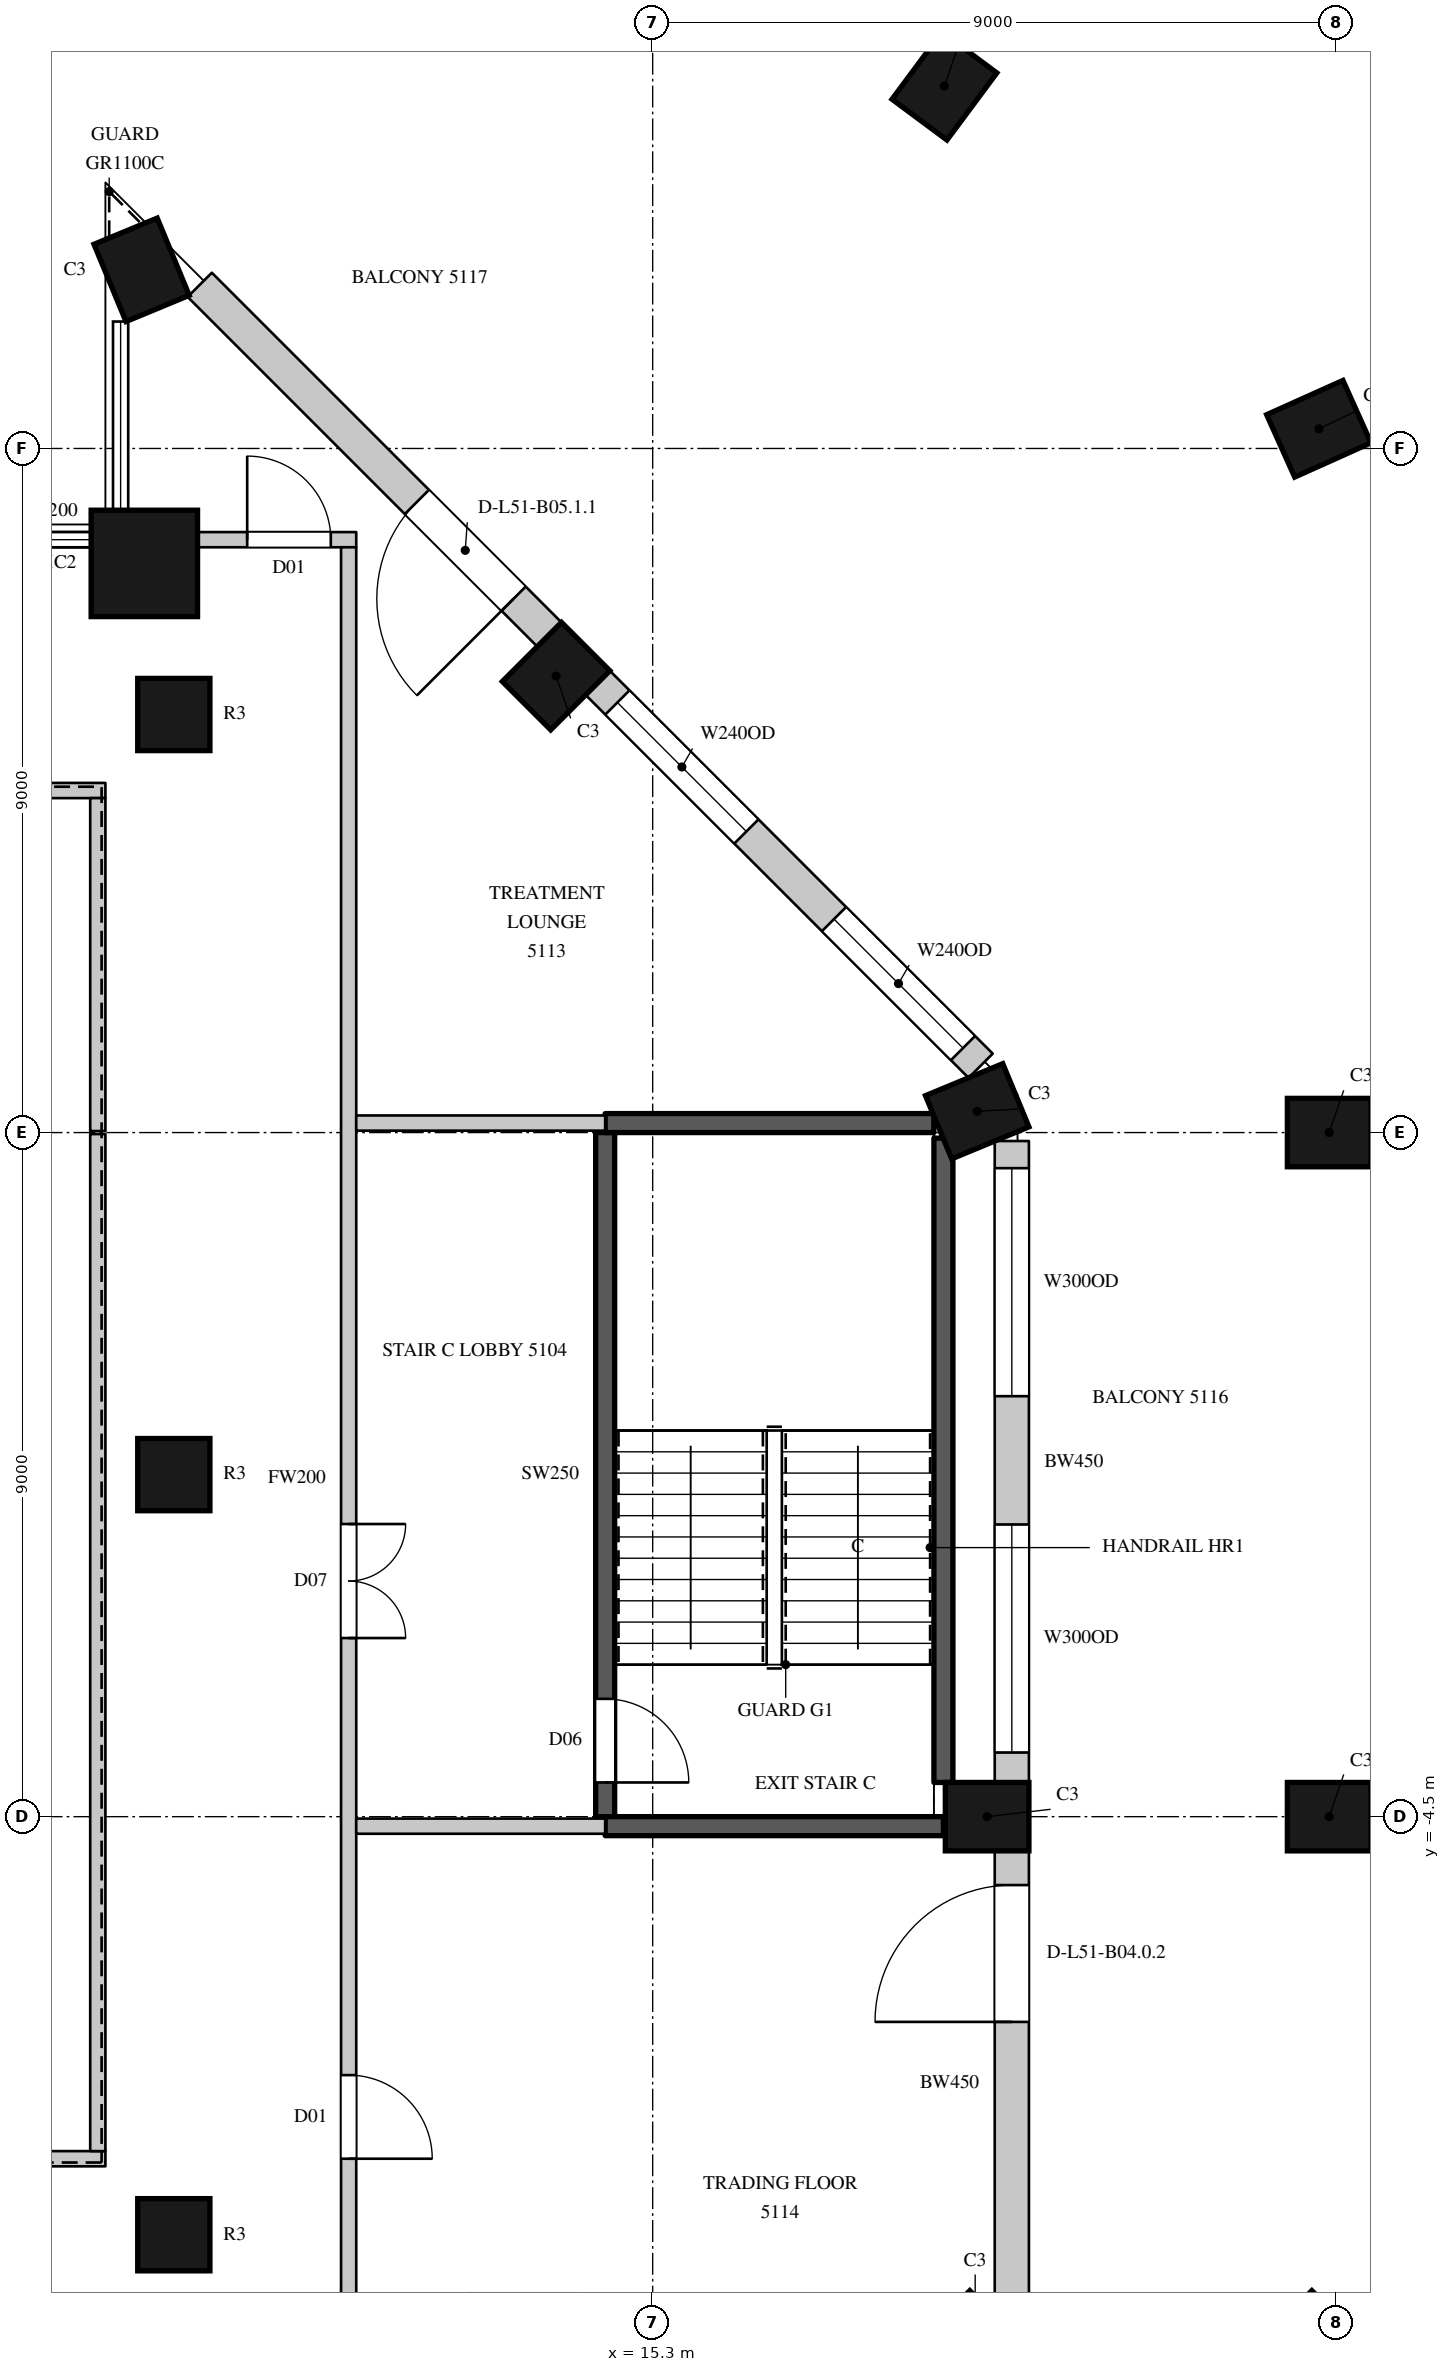
"""IFC4 building model, lengths in metres.
Left out: names, types, materials, properties, quantities, classifications, styles, units other than length and angle.
Written with IfcOpenShell. Run it as: python <this file> out.ifc"""

import sys

from ifc_helpers import new_model, si_unit, direction, frame, frame_2d, origin, origin_2d, place, context, subcontext, project, spatial, rectangle, circle, extrude, element, fill, save


model = new_model("IFC4")
c1 = context("Model", 3, precision=1e-05, world=origin(), true_north=direction((0.0, 1.0)))
c2 = subcontext(c1, "Body", "Model", "MODEL_VIEW")
j1 = project(units=[si_unit("LENGTHUNIT", "METRE"), si_unit("PLANEANGLEUNIT", "RADIAN")], contexts=[c1])
p1 = place(None, origin())
s1 = spatial("IfcSite", under=j1, at=p1, CompositionType="ELEMENT")
p2 = place(p1, origin())
s2 = spatial("IfcBuilding", under=s1, at=p2, CompositionType="ELEMENT")
p3 = place(p2, frame((0.0, 0.0, 230.2)))
s3 = spatial("IfcBuildingStorey", under=s2, at=p3, CompositionType="ELEMENT", Elevation=230.2)
for number, where, z_axis, x_axis in (
    (1, (19.543, -11.443, 0.0), (0.0, 0.0, 1.0), (0.707, 0.707, 0.0)),
    (2, (19.7, -4.5, 0.0), (0.0, 0.0, 1.0), (0.0, 1.0, 0.0)),
    (3, (19.57, 4.78, 0.0), (0.0, 0.0, 1.0), (-0.383, 0.924, 0.0)),
    (4, (14.029, 10.505, 0.0), (0.0, 0.0, 1.0), (-0.707, 0.707, 0.0)),
    (5, (8.576, 15.85, 0.0), (0.0, 0.0, 1.0), (-0.924, -0.383, 0.0)),
):
    element("IfcColumn", number, at=place(p3, frame(where, z_axis=z_axis, x_axis=x_axis)), inside=s3, PredefinedType="COLUMN", context=c2, shape_type="SweptSolid", body=[
        extrude(rectangle(XDim=0.9, YDim=1.1, at=origin_2d()), origin(), (0.0, 0.0, 1.0), 4.1),
    ])
p4 = place(p3, frame((8.612, 11.988, 0.0), z_axis=(0.0, 0.0, 1.0), x_axis=(1.0, 0.0, 0.0)))
e6 = element("IfcColumn", 6, at=p4, inside=s3, PredefinedType="COLUMN", context=c2, shape_type="SweptSolid", body=[
    extrude(circle(Radius=0.7, at=origin_2d()), origin(), (0.0, 0.0, 1.0), 4.1),
])
for number, where, z_axis, x_axis in (
    (7, (24.043, -11.443, 0.0), (0.0, 0.0, 1.0), (0.707, 0.707, 0.0)),
    (8, (24.2, -4.5, 0.0), (0.0, 0.0, 1.0), (0.0, 1.0, 0.0)),
    (9, (24.2, 4.5, 0.0), (0.0, 0.0, 1.0), (0.0, 1.0, 0.0)),
    (10, (24.064, 13.759, 0.0), (0.0, 0.0, 1.0), (-0.41, 0.912, 0.0)),
    (11, (19.138, 18.268, 0.0), (0.0, 0.0, 1.0), (-0.803, 0.596, 0.0)),
):
    element("IfcColumn", number, at=place(p3, frame(where, z_axis=z_axis, x_axis=x_axis)), inside=s3, PredefinedType="COLUMN", context=c2, shape_type="SweptSolid", body=[
        extrude(rectangle(XDim=0.9, YDim=1.1, at=origin_2d()), origin(), (0.0, 0.0, 1.0), 4.1),
    ])
for number, where, z_axis, x_axis in (
    (12, (9.0, -10.0, 0.0), (0.0, 0.0, 1.0), (1.0, 0.0, 0.0)),
    (13, (9.0, 0.0, 0.0), (0.0, 0.0, 1.0), (1.0, 0.0, 0.0)),
    (14, (9.0, 10.0, 0.0), (0.0, 0.0, 1.0), (1.0, 0.0, 0.0)),
):
    element("IfcColumn", number, at=place(p3, frame(where, z_axis=z_axis, x_axis=x_axis)), inside=s3, PredefinedType="COLUMN", context=c2, shape_type="SweptSolid", body=[
        extrude(circle(Radius=0.475, at=origin_2d()), origin(), (0.0, 0.0, 1.0), 4.1),
    ])
p5 = place(p3, frame((20.025, -11.064, 0.0), z_axis=(0.0, 0.0, 1.0), x_axis=(0.0, 1.0, 0.0)))
e15 = element("IfcWall", 15, at=p5, inside=s3, PredefinedType="SOLIDWALL", context=c2, shape_type="SweptSolid", body=[
    extrude(rectangle(XDim=6.114, YDim=0.45, at=frame_2d((3.057, 0.0))), origin(), (0.0, 0.0, 1.0), 3.8),
])
p6 = place(p5, frame((3.864, 0.0, 0.0)))
e16 = element("IfcOpeningElement", 16, at=p6, cuts=e15, PredefinedType="OPENING", context=c2, shape_type="SweptSolid", body=[
    extrude(rectangle(XDim=1.8, YDim=2.4, at=frame_2d((0.9, 1.2))), frame((0.0, 0.235, 0.0), z_axis=(0.0, -1.0, 0.0), x_axis=(1.0, 0.0, 0.0)), (0.0, 0.0, 1.0), 0.47),
])
p7 = place(p3, frame((20.025, -4.05, 0.0), z_axis=(0.0, 0.0, 1.0), x_axis=(0.0, 1.0, 0.0)))
e17 = element("IfcWall", 17, at=p7, inside=s3, PredefinedType="SOLIDWALL", context=c2, shape_type="SweptSolid", body=[
    extrude(rectangle(XDim=8.439, YDim=0.45, at=frame_2d((4.219, 0.0))), origin(), (0.0, 0.0, 1.0), 3.8),
])
p8 = place(p7, frame((0.394, 0.0, 1.05)))
e18 = element("IfcOpeningElement", 18, at=p8, cuts=e17, PredefinedType="OPENING", context=c2, shape_type="SweptSolid", body=[
    extrude(rectangle(XDim=3.0, YDim=2.4, at=frame_2d((1.5, 1.2))), frame((0.0, 0.235, 0.0), z_axis=(0.0, -1.0, 0.0), x_axis=(1.0, 0.0, 0.0)), (0.0, 0.0, 1.0), 0.47),
])
p9 = place(p7, frame((5.082, 0.0, 1.05)))
e19 = element("IfcOpeningElement", 19, at=p9, cuts=e17, PredefinedType="OPENING", context=c2, shape_type="SweptSolid", body=[
    extrude(rectangle(XDim=3.0, YDim=2.4, at=frame_2d((1.5, 1.2))), frame((0.0, 0.235, 0.0), z_axis=(0.0, -1.0, 0.0), x_axis=(1.0, 0.0, 0.0)), (0.0, 0.0, 1.0), 0.47),
])
p10 = place(p3, frame((19.615, 5.379, 0.0), z_axis=(0.0, 0.0, 1.0), x_axis=(-0.707089646058, 0.7071239159, 0.0)))
e20 = element("IfcWall", 20, at=p10, inside=s3, PredefinedType="SOLIDWALL", context=c2, shape_type="SweptSolid", body=[
    extrude(rectangle(XDim=7.124, YDim=0.45, at=frame_2d((3.562, 0.0))), origin(), (0.0, 0.0, 1.0), 3.8),
])
p11 = place(p10, frame((0.328, 0.0, 1.05)))
e21 = element("IfcOpeningElement", 21, at=p11, cuts=e20, PredefinedType="OPENING", context=c2, shape_type="SweptSolid", body=[
    extrude(rectangle(XDim=2.4, YDim=2.4, at=frame_2d((1.2, 1.2))), frame((0.0, 0.235, 0.0), z_axis=(0.0, -1.0, 0.0), x_axis=(1.0, 0.0, 0.0)), (0.0, 0.0, 1.0), 0.47),
])
p12 = place(p10, frame((4.359, 0.0, 1.05)))
e22 = element("IfcOpeningElement", 22, at=p12, cuts=e20, PredefinedType="OPENING", context=c2, shape_type="SweptSolid", body=[
    extrude(rectangle(XDim=2.4, YDim=2.4, at=frame_2d((1.2, 1.2))), frame((0.0, 0.235, 0.0), z_axis=(0.0, -1.0, 0.0), x_axis=(1.0, 0.0, 0.0)), (0.0, 0.0, 1.0), 0.47),
])
p13 = place(p3, frame((13.941, 11.053, 0.0), z_axis=(0.0, 0.0, 1.0), x_axis=(-0.707106781187, 0.707106781187, 0.0)))
e23 = element("IfcWall", 23, at=p13, inside=s3, PredefinedType="SOLIDWALL", context=c2, shape_type="SweptSolid", body=[
    extrude(rectangle(XDim=6.505, YDim=0.45, at=frame_2d((3.252, 0.0))), origin(), (0.0, 0.0, 1.0), 3.8),
])
p14 = place(p13, frame((0.665, 0.0, 0.0)))
e24 = element("IfcOpeningElement", 24, at=p14, cuts=e23, PredefinedType="OPENING", context=c2, shape_type="SweptSolid", body=[
    extrude(rectangle(XDim=1.8, YDim=2.4, at=frame_2d((0.9, 1.2))), frame((0.0, 0.235, 0.0), z_axis=(0.0, -1.0, 0.0), x_axis=(1.0, 0.0, 0.0)), (0.0, 0.0, 1.0), 0.47),
])
p15 = place(p3, frame((21.1, -5.1, 0.0), z_axis=(0.0, 0.0, 1.0), x_axis=(0.0, 1.0, 0.0)))
e25 = element("IfcWall", 25, at=p15, inside=s3, PredefinedType="SOLIDWALL", context=c2, shape_type="SweptSolid", body=[
    extrude(rectangle(XDim=3.583, YDim=0.45, at=frame_2d((1.792, 0.0))), origin(), (0.0, 0.0, 1.0), 0.6),
])
p16 = place(p3, frame((21.1, -0.617, 0.0), z_axis=(0.0, 0.0, 1.0), x_axis=(0.0, 1.0, 0.0)))
e26 = element("IfcWall", 26, at=p16, inside=s3, PredefinedType="SOLIDWALL", context=c2, shape_type="SweptSolid", body=[
    extrude(rectangle(XDim=2.567, YDim=0.45, at=frame_2d((1.283, 0.0))), origin(), (0.0, 0.0, 1.0), 0.6),
])
p17 = place(p3, frame((16.206, 10.308, 0.0), z_axis=(0.0, 0.0, 1.0), x_axis=(-0.707057827829, 0.707155731156, 0.0)))
e27 = element("IfcWall", 27, at=p17, inside=s3, PredefinedType="SOLIDWALL", context=c2, shape_type="SweptSolid", body=[
    extrude(rectangle(XDim=2.494, YDim=0.45, at=frame_2d((1.247, 0.0))), origin(), (0.0, 0.0, 1.0), 0.6),
])
p18 = place(p3, frame((12.251, 14.263, 0.0), z_axis=(0.0, 0.0, 1.0), x_axis=(-0.707039709166, 0.707173846846, 0.0)))
e28 = element("IfcWall", 28, at=p18, inside=s3, PredefinedType="SOLIDWALL", context=c2, shape_type="SweptSolid", body=[
    extrude(rectangle(XDim=1.82, YDim=0.45, at=frame_2d((0.91, 0.0))), origin(), (0.0, 0.0, 1.0), 0.6),
])
p19 = place(p3, frame((6.75, 12.3, 0.0), z_axis=(0.0, 0.0, 1.0), x_axis=(1.0, 0.0, 0.0)))
e29 = element("IfcWall", 29, at=p19, inside=s3, PredefinedType="PARTITIONING", context=c2, shape_type="SweptSolid", body=[
    extrude(rectangle(XDim=1.209, YDim=0.2, at=frame_2d((0.604, 0.0))), origin(), (0.0, 0.0, 1.0), 3.8),
])
for number, where, z_axis, x_axis in (
    (30, (-6.1, -9.0, 0.0), (0.0, 0.0, 1.0), (1.0, 0.0, 0.0)),
    (31, (-6.1, 9.0, 0.0), (0.0, 0.0, 1.0), (1.0, 0.0, 0.0)),
):
    element("IfcWall", number, at=place(p3, frame(where, z_axis=z_axis, x_axis=x_axis)), inside=s3, PredefinedType="PARTITIONING", context=c2, shape_type="SweptSolid", body=[
        extrude(rectangle(XDim=14.2, YDim=0.2, at=frame_2d((7.1, 0.0))), origin(), (0.0, 0.0, 1.0), 3.8),
    ])
p20 = place(p3, frame((8.0, -8.9, 0.0), z_axis=(0.0, 0.0, 1.0), x_axis=(0.0, 1.0, 0.0)))
e32 = element("IfcWall", 32, at=p20, inside=s3, PredefinedType="PARTITIONING", context=c2, shape_type="SweptSolid", body=[
    extrude(rectangle(XDim=13.38, YDim=0.2, at=frame_2d((6.69, 0.0))), origin(), (0.0, 0.0, 1.0), 3.8),
])
p21 = place(p3, frame((8.0, 4.52, 0.0), z_axis=(0.0, 0.0, 1.0), x_axis=(0.0, 1.0, 0.0)))
e33 = element("IfcWall", 33, at=p21, inside=s3, PredefinedType="PARTITIONING", context=c2, shape_type="SweptSolid", body=[
    extrude(rectangle(XDim=4.38, YDim=0.2, at=frame_2d((2.19, 0.0))), origin(), (0.0, 0.0, 1.0), 3.8),
])
p22 = place(p3, frame((9.265, 12.3, 0.0), z_axis=(0.0, 0.0, 1.0), x_axis=(1.0, 0.0, 0.0)))
e34 = element("IfcWall", 34, at=p22, inside=s3, PredefinedType="PARTITIONING", context=c2, shape_type="SweptSolid", body=[
    extrude(rectangle(XDim=2.135, YDim=0.2, at=frame_2d((1.067, 0.0))), origin(), (0.0, 0.0, 1.0), 3.8),
])
p23 = place(p22, frame((0.7, 0.0, 0.0)))
e35 = element("IfcOpeningElement", 35, at=p23, cuts=e34, PredefinedType="OPENING", context=c2, shape_type="SweptSolid", body=[
    extrude(rectangle(XDim=1.1, YDim=2.4, at=frame_2d((0.55, 1.2))), frame((0.0, 0.11, 0.0), z_axis=(0.0, -1.0, 0.0), x_axis=(1.0, 0.0, 0.0)), (0.0, 0.0, 1.0), 0.22),
])
p24 = place(p3, frame((11.3, -12.3, 0.0), z_axis=(0.0, 0.0, 1.0), x_axis=(0.0, 1.0, 0.0)))
e36 = element("IfcWall", 36, at=p24, inside=s3, PredefinedType="PARTITIONING", context=c2, shape_type="SweptSolid", body=[
    extrude(rectangle(XDim=24.5, YDim=0.2, at=frame_2d((12.25, 0.0))), origin(), (0.0, 0.0, 1.0), 3.8),
])
p25 = place(p24, frame((10.15, 0.0, 0.0)))
e37 = element("IfcOpeningElement", 37, at=p25, cuts=e36, PredefinedType="OPENING", context=c2, shape_type="SweptSolid", body=[
    extrude(rectangle(XDim=1.5, YDim=2.4, at=frame_2d((0.75, 1.2))), frame((0.0, 0.11, 0.0), z_axis=(0.0, -1.0, 0.0), x_axis=(1.0, 0.0, 0.0)), (0.0, 0.0, 1.0), 0.22),
])
p26 = place(p24, frame((3.3, 0.0, 0.0)))
e38 = element("IfcOpeningElement", 38, at=p26, cuts=e36, PredefinedType="OPENING", context=c2, shape_type="SweptSolid", body=[
    extrude(rectangle(XDim=1.1, YDim=2.4, at=frame_2d((0.55, 1.2))), frame((0.0, 0.11, 0.0), z_axis=(0.0, -1.0, 0.0), x_axis=(1.0, 0.0, 0.0)), (0.0, 0.0, 1.0), 0.22),
])
for number, where, z_axis, x_axis in (
    (39, (11.4, -4.625, 0.0), (0.0, 0.0, 1.0), (1.0, 0.0, 0.0)),
    (40, (11.4, 4.625, 0.0), (0.0, 0.0, 1.0), (1.0, 0.0, 0.0)),
):
    element("IfcWall", number, at=place(p3, frame(where, z_axis=z_axis, x_axis=x_axis)), inside=s3, PredefinedType="PARTITIONING", context=c2, shape_type="SweptSolid", body=[
        extrude(rectangle(XDim=3.275, YDim=0.2, at=frame_2d((1.638, 0.0))), origin(), (0.0, 0.0, 1.0), 3.8),
    ])
p27 = place(p3, frame((14.675, -4.5, 0.0), z_axis=(0.0, 0.0, 1.0), x_axis=(0.0, 1.0, 0.0)))
e41 = element("IfcWall", 41, at=p27, inside=s3, PredefinedType="SHEAR", context=c2, shape_type="SweptSolid", body=[
    extrude(rectangle(XDim=9.0, YDim=0.25, at=frame_2d((4.5, 0.0))), origin(), (0.0, 0.0, 1.0), 3.8),
])
p28 = place(p27, frame((0.45, 0.0, 0.0)))
e42 = element("IfcOpeningElement", 42, at=p28, cuts=e41, PredefinedType="OPENING", context=c2, shape_type="SweptSolid", body=[
    extrude(rectangle(XDim=1.1, YDim=2.2, at=frame_2d((0.55, 1.1))), frame((0.0, 0.135, 0.0), z_axis=(0.0, -1.0, 0.0), x_axis=(1.0, 0.0, 0.0)), (0.0, 0.0, 1.0), 0.27),
])
p29 = place(p3, frame((14.675, -4.625, 0.0), z_axis=(0.0, 0.0, 1.0), x_axis=(1.0, 0.0, 0.0)))
e43 = element("IfcWall", 43, at=p29, inside=s3, PredefinedType="SHEAR", context=c2, shape_type="SweptSolid", body=[
    extrude(rectangle(XDim=4.45, YDim=0.25, at=frame_2d((2.225, 0.0))), origin(), (0.0, 0.0, 1.0), 3.8),
])
p30 = place(p3, frame((14.675, 4.625, 0.0), z_axis=(0.0, 0.0, 1.0), x_axis=(1.0, 0.0, 0.0)))
e44 = element("IfcWall", 44, at=p30, inside=s3, PredefinedType="SHEAR", context=c2, shape_type="SweptSolid", body=[
    extrude(rectangle(XDim=4.324, YDim=0.25, at=frame_2d((2.162, 0.0))), origin(), (0.0, 0.0, 1.0), 3.8),
])
p31 = place(p3, frame((19.125, -4.05, 0.0), z_axis=(0.0, 0.0, 1.0), x_axis=(0.0, 1.0, 0.0)))
e45 = element("IfcWall", 45, at=p31, inside=s3, PredefinedType="SHEAR", context=c2, shape_type="SweptSolid", body=[
    extrude(rectangle(XDim=8.477, YDim=0.25, at=frame_2d((4.238, 0.0))), origin(), (0.0, 0.0, 1.0), 3.8),
])
p32 = place(p6, origin())
e46 = element("IfcDoor", 46, at=p32, inside=s3, OperationType="SLIDING_TO_LEFT", PredefinedType="DOOR", context=c2, shape_type="SweptSolid", body=[
    extrude(rectangle(XDim=1.8, YDim=2.4, at=frame_2d((0.9, 1.2))), frame((0.0, 0.13, 0.0), z_axis=(0.0, -1.0, 0.0), x_axis=(1.0, 0.0, 0.0)), (0.0, 0.0, 1.0), 0.05),
])
fill(e16, e46)
p33 = place(p8, origin())
e47 = element("IfcWindow", 47, at=p33, inside=s3, PartitioningType="SINGLE_PANEL", PredefinedType="WINDOW", context=c2, shape_type="SweptSolid", body=[
    extrude(rectangle(XDim=3.0, YDim=2.4, at=frame_2d((1.5, 1.2))), frame((0.0, 0.135, 0.0), z_axis=(0.0, -1.0, 0.0), x_axis=(1.0, 0.0, 0.0)), (0.0, 0.0, 1.0), 0.06),
])
fill(e18, e47)
p34 = place(p9, origin())
e48 = element("IfcWindow", 48, at=p34, inside=s3, PartitioningType="SINGLE_PANEL", PredefinedType="WINDOW", context=c2, shape_type="SweptSolid", body=[
    extrude(rectangle(XDim=3.0, YDim=2.4, at=frame_2d((1.5, 1.2))), frame((0.0, 0.135, 0.0), z_axis=(0.0, -1.0, 0.0), x_axis=(1.0, 0.0, 0.0)), (0.0, 0.0, 1.0), 0.06),
])
fill(e19, e48)
p35 = place(p11, origin())
e49 = element("IfcWindow", 49, at=p35, inside=s3, PartitioningType="SINGLE_PANEL", PredefinedType="WINDOW", context=c2, shape_type="SweptSolid", body=[
    extrude(rectangle(XDim=2.4, YDim=2.4, at=frame_2d((1.2, 1.2))), frame((0.0, 0.135, 0.0), z_axis=(0.0, -1.0, 0.0), x_axis=(1.0, 0.0, 0.0)), (0.0, 0.0, 1.0), 0.06),
])
fill(e21, e49)
p36 = place(p12, origin())
e50 = element("IfcWindow", 50, at=p36, inside=s3, PartitioningType="SINGLE_PANEL", PredefinedType="WINDOW", context=c2, shape_type="SweptSolid", body=[
    extrude(rectangle(XDim=2.4, YDim=2.4, at=frame_2d((1.2, 1.2))), frame((0.0, 0.135, 0.0), z_axis=(0.0, -1.0, 0.0), x_axis=(1.0, 0.0, 0.0)), (0.0, 0.0, 1.0), 0.06),
])
fill(e22, e50)
p37 = place(p14, origin())
e51 = element("IfcDoor", 51, at=p37, inside=s3, OperationType="SLIDING_TO_LEFT", PredefinedType="DOOR", context=c2, shape_type="SweptSolid", body=[
    extrude(rectangle(XDim=1.8, YDim=2.4, at=frame_2d((0.9, 1.2))), frame((0.0, 0.13, 0.0), z_axis=(0.0, -1.0, 0.0), x_axis=(1.0, 0.0, 0.0)), (0.0, 0.0, 1.0), 0.05),
])
fill(e24, e51)
p38 = place(p25, origin())
e52 = element("IfcDoor", 52, at=p38, inside=s3, OperationType="DOUBLE_DOOR_SINGLE_SWING", PredefinedType="DOOR", context=c2, shape_type="SweptSolid", body=[
    extrude(rectangle(XDim=1.5, YDim=2.4, at=frame_2d((0.75, 1.2))), frame((0.0, 0.025, 0.0), z_axis=(0.0, -1.0, 0.0), x_axis=(1.0, 0.0, 0.0)), (0.0, 0.0, 1.0), 0.05),
])
fill(e37, e52)
p39 = place(p23, origin())
e53 = element("IfcDoor", 53, at=p39, inside=s3, OperationType="SINGLE_SWING_LEFT", PredefinedType="DOOR", context=c2, shape_type="SweptSolid", body=[
    extrude(rectangle(XDim=1.1, YDim=2.4, at=frame_2d((0.55, 1.2))), frame((0.0, 0.025, 0.0), z_axis=(0.0, -1.0, 0.0), x_axis=(1.0, 0.0, 0.0)), (0.0, 0.0, 1.0), 0.05),
])
fill(e35, e53)
p40 = place(p26, origin())
e54 = element("IfcDoor", 54, at=p40, inside=s3, OperationType="SINGLE_SWING_RIGHT", PredefinedType="DOOR", context=c2, shape_type="SweptSolid", body=[
    extrude(rectangle(XDim=1.1, YDim=2.4, at=frame_2d((0.55, 1.2))), frame((0.0, 0.025, 0.0), z_axis=(0.0, -1.0, 0.0), x_axis=(1.0, 0.0, 0.0)), (0.0, 0.0, 1.0), 0.05),
])
fill(e38, e54)
p41 = place(p28, origin())
e55 = element("IfcDoor", 55, at=p41, inside=s3, OperationType="SINGLE_SWING_RIGHT", PredefinedType="DOOR", context=c2, shape_type="SweptSolid", body=[
    extrude(rectangle(XDim=1.1, YDim=2.2, at=frame_2d((0.55, 1.1))), frame((0.0, 0.025, 0.0), z_axis=(0.0, -1.0, 0.0), x_axis=(1.0, 0.0, 0.0)), (0.0, 0.0, 1.0), 0.05),
])
fill(e42, e55)
save(model, sys.argv[1])
